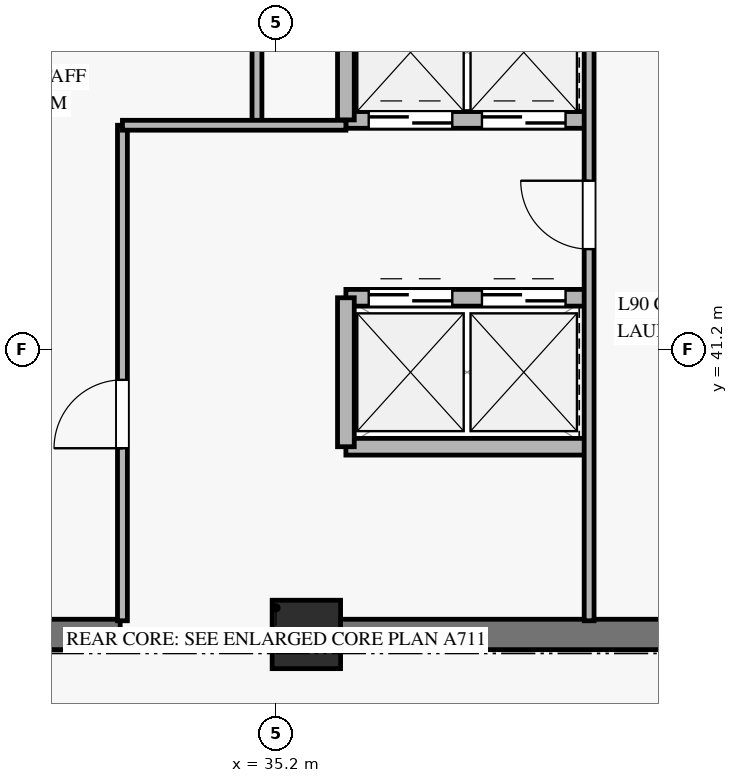
"""IFC4 building model, lengths in metres.
Left out: names, types, materials, properties, quantities, classifications, styles, units other than length and angle.
Written with IfcOpenShell. Run it as: python <this file> out.ifc"""

import sys

from ifc_helpers import new_model, si_unit, direction, frame, frame_2d, origin, origin_2d, place, context, subcontext, project, spatial, rectangle, extrude, source, transform, mapped, element, fill, save


model = new_model("IFC4")
c1 = context("Model", 3, precision=1e-05, world=origin(), true_north=direction((0.0, 1.0)))
c2 = subcontext(c1, "Body", "Model", "MODEL_VIEW")
j1 = project(units=[si_unit("LENGTHUNIT", "METRE"), si_unit("PLANEANGLEUNIT", "RADIAN")], contexts=[c1])
p1 = place(None, origin())
s1 = spatial("IfcSite", under=j1, at=p1, CompositionType="ELEMENT")
p2 = place(p1, origin())
s2 = spatial("IfcBuilding", under=s1, at=p2, CompositionType="ELEMENT")
p3 = place(p2, frame((0.0, 0.0, 345.9)))
s3 = spatial("IfcBuildingStorey", under=s2, at=p3, CompositionType="ELEMENT", Elevation=345.9)
m1 = source(origin(), c2, "Body", "SweptSolid", [
    extrude(rectangle(XDim=0.9, YDim=0.9, at=origin_2d()), origin(), (0.0, 0.0, 1.0), 3.185),
])
p4 = place(p3, frame((35.6, 37.45, 0.0), z_axis=(0.0, 0.0, 1.0), x_axis=(1.0, 0.0, 0.0)))
e1 = element("IfcColumn", 1, at=p4, inside=s3, PredefinedType="PILASTER", context=c2, shape_type="MappedRepresentation", body=[
    mapped(m1, transform((0.0, 0.0, 0.0), x_axis=(1.0, 0.0, 0.0), y_axis=(0.0, 1.0, 0.0), z_axis=(0.0, 0.0, 1.0), scale=1.0)),
])
p5 = place(p3, frame((31.25, 37.45, 0.0), z_axis=(0.0, 0.0, 1.0), x_axis=(1.0, 0.0, 0.0)))
e2 = element("IfcWall", 2, at=p5, inside=s3, PredefinedType="SHEAR", context=c2, shape_type="SweptSolid", body=[
    extrude(rectangle(XDim=1.9, YDim=0.4, at=frame_2d((0.95, 0.0))), origin(), (0.0, 0.0, 1.0), 3.185),
])
p6 = place(p3, frame((36.05, 37.45, 0.0), z_axis=(0.0, 0.0, 1.0), x_axis=(1.0, 0.0, 0.0)))
e3 = element("IfcWall", 3, at=p6, inside=s3, PredefinedType="SHEAR", context=c2, shape_type="SweptSolid", body=[
    extrude(rectangle(XDim=7.8, YDim=0.4, at=frame_2d((3.9, 0.0))), origin(), (0.0, 0.0, 1.0), 3.185),
])
p7 = place(p3, frame((36.12, 44.22, 0.0), z_axis=(0.0, 0.0, 1.0), x_axis=(1.0, 0.0, 0.0)))
e4 = element("IfcWall", 4, at=p7, inside=s3, PredefinedType="SOLIDWALL", context=c2, shape_type="SweptSolid", body=[
    extrude(rectangle(XDim=3.2, YDim=0.22, at=frame_2d((1.6, 0.0))), origin(), (0.0, 0.0, 1.0), 3.185),
])
p8 = place(p7, frame((0.3, 0.0, 0.0)))
e5 = element("IfcOpeningElement", 5, at=p8, cuts=e4, PredefinedType="OPENING", context=c2, shape_type="SweptSolid", body=[
    extrude(rectangle(XDim=1.1, YDim=2.2, at=frame_2d((0.55, 1.1))), frame((0.0, 0.12, 0.0), z_axis=(0.0, -1.0, 0.0), x_axis=(1.0, 0.0, 0.0)), (0.0, 0.0, 1.0), 0.24),
])
p9 = place(p7, frame((1.79, 0.0, 0.0)))
e6 = element("IfcOpeningElement", 6, at=p9, cuts=e4, PredefinedType="OPENING", context=c2, shape_type="SweptSolid", body=[
    extrude(rectangle(XDim=1.1, YDim=2.2, at=frame_2d((0.55, 1.1))), frame((0.0, 0.12, 0.0), z_axis=(0.0, -1.0, 0.0), x_axis=(1.0, 0.0, 0.0)), (0.0, 0.0, 1.0), 0.24),
])
p10 = place(p3, frame((36.12, 41.88, 0.0), z_axis=(0.0, 0.0, 1.0), x_axis=(1.0, 0.0, 0.0)))
e7 = element("IfcWall", 7, at=p10, inside=s3, PredefinedType="SOLIDWALL", context=c2, shape_type="SweptSolid", body=[
    extrude(rectangle(XDim=3.2, YDim=0.22, at=frame_2d((1.6, 0.0))), origin(), (0.0, 0.0, 1.0), 3.185),
])
p11 = place(p10, frame((0.3, 0.0, 0.0)))
e8 = element("IfcOpeningElement", 8, at=p11, cuts=e7, PredefinedType="OPENING", context=c2, shape_type="SweptSolid", body=[
    extrude(rectangle(XDim=1.1, YDim=2.2, at=frame_2d((0.55, 1.1))), frame((0.0, 0.12, 0.0), z_axis=(0.0, -1.0, 0.0), x_axis=(1.0, 0.0, 0.0)), (0.0, 0.0, 1.0), 0.24),
])
p12 = place(p10, frame((1.79, 0.0, 0.0)))
e9 = element("IfcOpeningElement", 9, at=p12, cuts=e7, PredefinedType="OPENING", context=c2, shape_type="SweptSolid", body=[
    extrude(rectangle(XDim=1.1, YDim=2.2, at=frame_2d((0.55, 1.1))), frame((0.0, 0.12, 0.0), z_axis=(0.0, -1.0, 0.0), x_axis=(1.0, 0.0, 0.0)), (0.0, 0.0, 1.0), 0.24),
])
p13 = place(p3, frame((36.12, 39.92, 0.0), z_axis=(0.0, 0.0, 1.0), x_axis=(1.0, 0.0, 0.0)))
e10 = element("IfcWall", 10, at=p13, inside=s3, PredefinedType="SOLIDWALL", context=c2, shape_type="SweptSolid", body=[
    extrude(rectangle(XDim=3.2, YDim=0.22, at=frame_2d((1.6, 0.0))), origin(), (0.0, 0.0, 1.0), 3.185),
])
p14 = place(p3, frame((36.12, 39.92, 0.0), z_axis=(0.0, 0.0, 1.0), x_axis=(0.0, 1.0, 0.0)))
e11 = element("IfcWall", 11, at=p14, inside=s3, PredefinedType="SOLIDWALL", context=c2, shape_type="SweptSolid", body=[
    extrude(rectangle(XDim=1.96, YDim=0.22, at=frame_2d((0.98, 0.0))), origin(), (0.0, 0.0, 1.0), 3.185),
])
p15 = place(p3, frame((36.12, 44.22, 0.0), z_axis=(0.0, 0.0, 1.0), x_axis=(0.0, 1.0, 0.0)))
e12 = element("IfcWall", 12, at=p15, inside=s3, PredefinedType="SOLIDWALL", context=c2, shape_type="SweptSolid", body=[
    extrude(rectangle(XDim=2.15, YDim=0.22, at=frame_2d((1.075, 0.0))), origin(), (0.0, 0.0, 1.0), 3.185),
])
p16 = place(p3, frame((33.18, 37.63, 0.0), z_axis=(0.0, 0.0, 1.0), x_axis=(0.0, 1.0, 0.0)))
e13 = element("IfcWall", 13, at=p16, inside=s3, PredefinedType="PARTITIONING", context=c2, shape_type="SweptSolid", body=[
    extrude(rectangle(XDim=6.52, YDim=0.13, at=frame_2d((3.26, 0.0))), origin(), (0.0, 0.0, 1.0), 2.27),
])
p17 = place(p16, frame((2.27, 0.0, 0.0)))
e14 = element("IfcOpeningElement", 14, at=p17, cuts=e13, PredefinedType="OPENING", context=c2, shape_type="SweptSolid", body=[
    extrude(rectangle(XDim=0.9, YDim=2.1, at=frame_2d((0.45, 1.05))), frame((0.0, 0.075, 0.0), z_axis=(0.0, -1.0, 0.0), x_axis=(1.0, 0.0, 0.0)), (0.0, 0.0, 1.0), 0.15),
])
p18 = place(p3, frame((34.95, 44.15, 0.0), z_axis=(0.0, 0.0, 1.0), x_axis=(0.0, 1.0, 0.0)))
e15 = element("IfcWall", 15, at=p18, inside=s3, PredefinedType="PARTITIONING", context=c2, shape_type="SweptSolid", body=[
    extrude(rectangle(XDim=2.22, YDim=0.13, at=frame_2d((1.11, 0.0))), origin(), (0.0, 0.0, 1.0), 3.185),
])
p19 = place(p3, frame((33.18, 44.15, 0.0), z_axis=(0.0, 0.0, 1.0), x_axis=(1.0, 0.0, 0.0)))
e16 = element("IfcWall", 16, at=p19, inside=s3, PredefinedType="PARTITIONING", context=c2, shape_type="SweptSolid", body=[
    extrude(rectangle(XDim=2.94, YDim=0.13, at=frame_2d((1.47, 0.0))), origin(), (0.0, 0.0, 1.0), 2.47),
])
p20 = place(p3, frame((39.32, 37.63, 0.0), z_axis=(0.0, 0.0, 1.0), x_axis=(0.0, 1.0, 0.0)))
e17 = element("IfcWall", 17, at=p20, inside=s3, PredefinedType="PARTITIONING", context=c2, shape_type="SweptSolid", body=[
    extrude(rectangle(XDim=8.74, YDim=0.13, at=frame_2d((4.37, 0.0))), origin(), (0.0, 0.0, 1.0), 3.185),
])
p21 = place(p20, frame((4.89, 0.0, 0.0)))
e18 = element("IfcOpeningElement", 18, at=p21, cuts=e17, PredefinedType="OPENING", context=c2, shape_type="SweptSolid", body=[
    extrude(rectangle(XDim=0.9, YDim=2.1, at=frame_2d((0.45, 1.05))), frame((0.0, 0.075, 0.0), z_axis=(0.0, -1.0, 0.0), x_axis=(1.0, 0.0, 0.0)), (0.0, 0.0, 1.0), 0.15),
])
m2 = source(origin(), c2, "Body", "SweptSolid", [
    extrude(rectangle(XDim=1.1, YDim=2.2, at=frame_2d((0.55, 1.1))), frame((0.0, 0.025, 0.0), z_axis=(0.0, -1.0, 0.0), x_axis=(1.0, 0.0, 0.0)), (0.0, 0.0, 1.0), 0.05),
])
p22 = place(p8, origin())
e19 = element("IfcDoor", 19, at=p22, inside=s3, OperationType="SLIDING_TO_LEFT", PredefinedType="DOOR", context=c2, shape_type="MappedRepresentation", body=[
    mapped(m2, transform((0.0, 0.0, 0.0), x_axis=(1.0, 0.0, 0.0), y_axis=(0.0, 1.0, 0.0), z_axis=(0.0, 0.0, 1.0), scale=1.0)),
])
fill(e5, e19)
p23 = place(p9, origin())
e20 = element("IfcDoor", 20, at=p23, inside=s3, OperationType="SLIDING_TO_LEFT", PredefinedType="DOOR", context=c2, shape_type="MappedRepresentation", body=[
    mapped(m2, transform((0.0, 0.0, 0.0), x_axis=(1.0, 0.0, 0.0), y_axis=(0.0, 1.0, 0.0), z_axis=(0.0, 0.0, 1.0), scale=1.0)),
])
fill(e6, e20)
p24 = place(p11, origin())
e21 = element("IfcDoor", 21, at=p24, inside=s3, OperationType="SLIDING_TO_LEFT", PredefinedType="DOOR", context=c2, shape_type="MappedRepresentation", body=[
    mapped(m2, transform((0.0, 0.0, 0.0), x_axis=(1.0, 0.0, 0.0), y_axis=(0.0, 1.0, 0.0), z_axis=(0.0, 0.0, 1.0), scale=1.0)),
])
fill(e8, e21)
p25 = place(p12, origin())
e22 = element("IfcDoor", 22, at=p25, inside=s3, OperationType="SLIDING_TO_LEFT", PredefinedType="DOOR", context=c2, shape_type="MappedRepresentation", body=[
    mapped(m2, transform((0.0, 0.0, 0.0), x_axis=(1.0, 0.0, 0.0), y_axis=(0.0, 1.0, 0.0), z_axis=(0.0, 0.0, 1.0), scale=1.0)),
])
fill(e9, e22)
m3 = source(origin(), c2, "Body", "SweptSolid", [
    extrude(rectangle(XDim=0.9, YDim=2.1, at=frame_2d((0.45, 1.05))), frame((0.0, 0.025, 0.0), z_axis=(0.0, -1.0, 0.0), x_axis=(1.0, 0.0, 0.0)), (0.0, 0.0, 1.0), 0.05),
])
p26 = place(p17, origin())
e23 = element("IfcDoor", 23, at=p26, inside=s3, OperationType="SINGLE_SWING_LEFT", PredefinedType="DOOR", context=c2, shape_type="MappedRepresentation", body=[
    mapped(m3, transform((0.0, 0.0, 0.0), x_axis=(1.0, 0.0, 0.0), y_axis=(0.0, 1.0, 0.0), z_axis=(0.0, 0.0, 1.0), scale=1.0)),
])
fill(e14, e23)
p27 = place(p21, origin())
e24 = element("IfcDoor", 24, at=p27, inside=s3, OperationType="SINGLE_SWING_RIGHT", PredefinedType="DOOR", context=c2, shape_type="MappedRepresentation", body=[
    mapped(m3, transform((0.0, 0.0, 0.0), x_axis=(1.0, 0.0, 0.0), y_axis=(0.0, 1.0, 0.0), z_axis=(0.0, 0.0, 1.0), scale=1.0)),
])
fill(e18, e24)
save(model, sys.argv[1])
